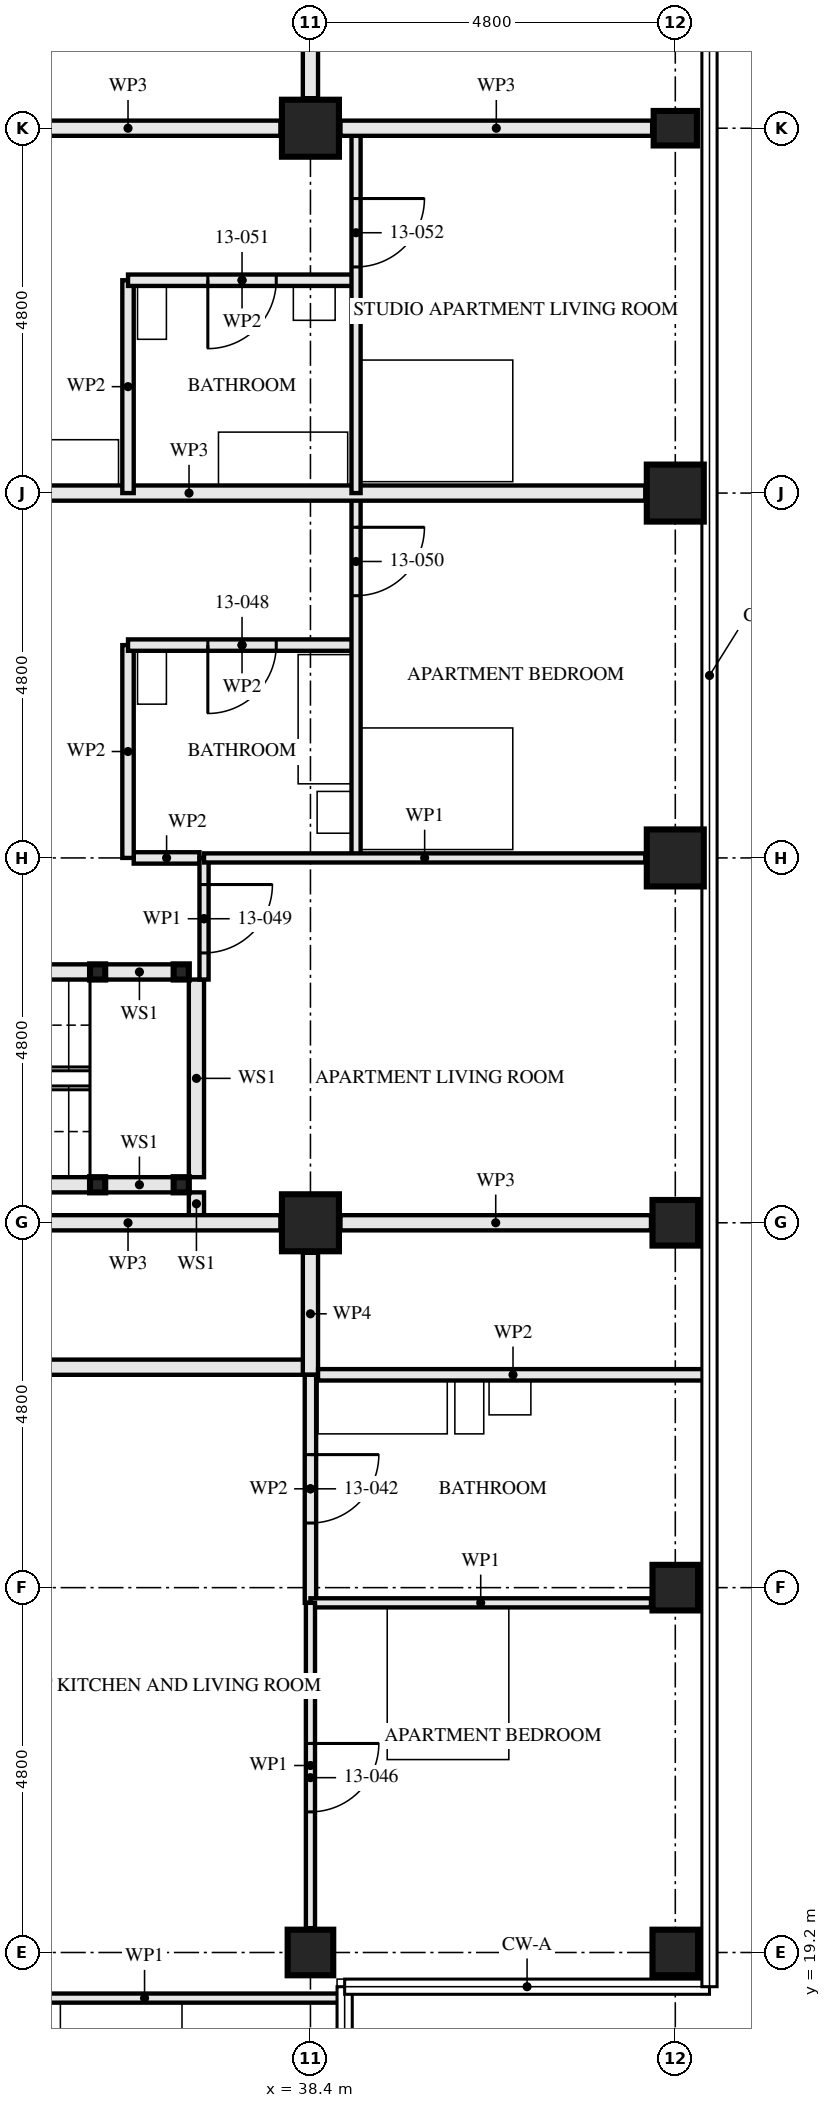
"""IFC4 building model, lengths in metres.
Left out: names, types, materials, properties, quantities, classifications, styles, units other than length and angle.
Written with IfcOpenShell. Run it as: python <this file> out.ifc"""

import sys

from ifc_helpers import new_model, si_unit, direction, frame, frame_2d, origin, origin_2d, place, context, subcontext, project, spatial, rectangle, hollow_rectangle, i_section, extrude, element, fill, save


model = new_model("IFC4")
c1 = context("Model", 3, precision=1e-05, world=origin(), true_north=direction((0.0, 1.0)))
c2 = subcontext(c1, "Body", "Model", "MODEL_VIEW")
j1 = project(units=[si_unit("LENGTHUNIT", "METRE"), si_unit("PLANEANGLEUNIT", "RADIAN")], contexts=[c1])
p1 = place(None, origin())
s1 = spatial("IfcSite", under=j1, at=p1, CompositionType="ELEMENT")
p2 = place(p1, origin())
s2 = spatial("IfcBuilding", under=s1, at=p2, CompositionType="ELEMENT")
p3 = place(p2, frame((0.0, 0.0, 51.5)))
s3 = spatial("IfcBuildingStorey", under=s2, at=p3, CompositionType="ELEMENT", Elevation=51.5)
p4 = place(p3, frame((38.4, 19.2, 0.0), z_axis=(0.0, 0.0, 1.0), x_axis=(0.0, 1.0, 0.0)))
e1 = element("IfcColumn", 1, at=p4, inside=s3, PredefinedType="COLUMN", context=c2, shape_type="SweptSolid", body=[
    extrude(hollow_rectangle(XDim=0.6, YDim=0.6, WallThickness=0.06, at=origin_2d()), origin(), (0.0, 0.0, 1.0), 3.5),
])
for number, where, z_axis, x_axis in (
    (2, (38.4, 28.8, 0.0), (0.0, 0.0, 1.0), (0.0, 1.0, 0.0)),
    (3, (38.4, 43.2, 0.0), (0.0, 0.0, 1.0), (0.0, 1.0, 0.0)),
):
    element("IfcColumn", number, at=place(p3, frame(where, z_axis=z_axis, x_axis=x_axis)), inside=s3, PredefinedType="COLUMN", context=c2, shape_type="SweptSolid", body=[
        extrude(hollow_rectangle(XDim=0.75, YDim=0.75, WallThickness=0.08, at=origin_2d()), origin(), (0.0, 0.0, 1.0), 3.5),
    ])
p5 = place(p3, frame((43.2, 19.2, 0.0), z_axis=(0.0, 0.0, 1.0), x_axis=(0.0, 1.0, 0.0)))
e4 = element("IfcColumn", 4, at=p5, inside=s3, PredefinedType="COLUMN", context=c2, shape_type="SweptSolid", body=[
    extrude(hollow_rectangle(XDim=0.6, YDim=0.6, WallThickness=0.06, at=origin_2d()), origin(), (0.0, 0.0, 1.0), 3.5),
])
for number, where, z_axis, x_axis in (
    (5, (43.2, 24.0, 0.0), (0.0, 0.0, 1.0), (1.0, 0.0, 0.0)),
    (6, (43.2, 28.8, 0.0), (0.0, 0.0, 1.0), (0.0, 1.0, 0.0)),
):
    element("IfcColumn", number, at=place(p3, frame(where, z_axis=z_axis, x_axis=x_axis)), inside=s3, PredefinedType="COLUMN", context=c2, shape_type="SweptSolid", body=[
        extrude(hollow_rectangle(XDim=0.6, YDim=0.6, WallThickness=0.08, at=origin_2d()), origin(), (0.0, 0.0, 1.0), 3.5),
    ])
for number, where, z_axis, x_axis in (
    (7, (43.2, 33.6, 0.0), (0.0, 0.0, 1.0), (1.0, 0.0, 0.0)),
    (8, (43.2, 38.4, 0.0), (0.0, 0.0, 1.0), (1.0, 0.0, 0.0)),
):
    element("IfcColumn", number, at=place(p3, frame(where, z_axis=z_axis, x_axis=x_axis)), inside=s3, PredefinedType="COLUMN", context=c2, shape_type="SweptSolid", body=[
        extrude(hollow_rectangle(XDim=0.75, YDim=0.75, WallThickness=0.08, at=origin_2d()), origin(), (0.0, 0.0, 1.0), 3.5),
    ])
p6 = place(p3, frame((43.2, 43.2, 0.0), z_axis=(0.0, 0.0, 1.0), x_axis=(0.0, 1.0, 0.0)))
e9 = element("IfcColumn", 9, at=p6, inside=s3, PredefinedType="COLUMN", context=c2, shape_type="SweptSolid", body=[
    extrude(i_section(OverallWidth=0.454, OverallDepth=0.569, WebThickness=0.078, FlangeThickness=0.125, FilletRadius=0.015, at=origin_2d()), origin(), (0.0, 0.0, 1.0), 3.5),
])
for number, where, z_axis, x_axis in (
    (10, (36.7, 29.3, 0.0), (0.0, 0.0, 1.0), (1.0, 0.0, 0.0)),
    (11, (36.7, 32.1, 0.0), (0.0, 0.0, 1.0), (1.0, 0.0, 0.0)),
    (12, (35.6, 29.3, 0.0), (0.0, 0.0, 1.0), (1.0, 0.0, 0.0)),
    (13, (35.6, 32.1, 0.0), (0.0, 0.0, 1.0), (1.0, 0.0, 0.0)),
):
    element("IfcColumn", number, at=place(p3, frame(where, z_axis=z_axis, x_axis=x_axis)), inside=s3, PredefinedType="COLUMN", context=c2, shape_type="SweptSolid", body=[
        extrude(hollow_rectangle(XDim=0.2, YDim=0.2, WallThickness=0.008, at=origin_2d()), origin(), (0.0, 0.0, 1.0), 3.33),
    ])
p7 = place(p3, frame((38.4, 23.8, 0.0), z_axis=(0.0, 0.0, 1.0), x_axis=(0.0, 1.0, 0.0)))
e14 = element("IfcWall", 14, at=p7, inside=s3, PredefinedType="PARTITIONING", context=c2, shape_type="SweptSolid", body=[
    extrude(rectangle(XDim=3.0, YDim=0.15, at=frame_2d((1.5, 0.0))), origin(), (0.0, 0.0, 1.0), 2.55),
])
p8 = place(p7, frame((1.05, 0.0, 0.0)))
e15 = element("IfcOpeningElement", 15, at=p8, cuts=e14, PredefinedType="OPENING", context=c2, shape_type="SweptSolid", body=[
    extrude(rectangle(XDim=0.9, YDim=2.1, at=frame_2d((0.45, 1.05))), frame((0.0, 0.085, 0.0), z_axis=(0.0, -1.0, 0.0), x_axis=(1.0, 0.0, 0.0)), (0.0, 0.0, 1.0), 0.171),
])
p9 = place(p3, frame((33.6, 18.6, 0.0), z_axis=(0.0, 0.0, 1.0), x_axis=(1.0, 0.0, 0.0)))
e16 = element("IfcWall", 16, at=p9, inside=s3, PredefinedType="PARTITIONING", context=c2, shape_type="SweptSolid", body=[
    extrude(rectangle(XDim=5.235, YDim=0.12, at=frame_2d((2.617, 0.0))), origin(), (0.0, 0.0, 1.0), 2.32),
])
p10 = place(p9, frame((0.45, 0.0, 0.0)))
e17 = element("IfcOpeningElement", 17, at=p10, cuts=e16, PredefinedType="OPENING", context=c2, shape_type="SweptSolid", body=[
    extrude(rectangle(XDim=0.9, YDim=2.1, at=frame_2d((0.45, 1.05))), frame((0.0, 0.071, 0.0), z_axis=(0.0, -1.0, 0.0), x_axis=(1.0, 0.0, 0.0)), (0.0, 0.0, 1.0), 0.141),
])
p11 = place(p3, frame((38.4, 23.8, 0.0), z_axis=(0.0, 0.0, 1.0), x_axis=(1.0, 0.0, 0.0)))
e18 = element("IfcWall", 18, at=p11, inside=s3, PredefinedType="PARTITIONING", context=c2, shape_type="SweptSolid", body=[
    extrude(rectangle(XDim=4.48, YDim=0.12, at=frame_2d((2.24, 0.0))), origin(), (0.0, 0.0, 1.0), 3.33),
])
p12 = place(p3, frame((38.4, 19.52, 0.0), z_axis=(0.0, 0.0, 1.0), x_axis=(0.0, 1.0, 0.0)))
e19 = element("IfcWall", 19, at=p12, inside=s3, PredefinedType="PARTITIONING", context=c2, shape_type="SweptSolid", body=[
    extrude(rectangle(XDim=4.28, YDim=0.12, at=frame_2d((2.14, 0.0))), origin(), (0.0, 0.0, 1.0), 3.33),
])
p13 = place(p12, frame((1.53, 0.0, 0.0)))
e20 = element("IfcOpeningElement", 20, at=p13, cuts=e19, PredefinedType="OPENING", context=c2, shape_type="SweptSolid", body=[
    extrude(rectangle(XDim=0.9, YDim=2.1, at=frame_2d((0.45, 1.05))), frame((0.0, 0.071, 0.0), z_axis=(0.0, -1.0, 0.0), x_axis=(1.0, 0.0, 0.0)), (0.0, 0.0, 1.0), 0.141),
])
p14 = place(p3, frame((28.8, 26.9, 0.0), z_axis=(0.0, 0.0, 1.0), x_axis=(1.0, 0.0, 0.0)))
e21 = element("IfcWall", 21, at=p14, inside=s3, PredefinedType="PARTITIONING", context=c2, shape_type="SweptSolid", body=[
    extrude(rectangle(XDim=9.6, YDim=0.2, at=frame_2d((4.8, 0.0))), origin(), (0.0, 0.0, 1.0), 3.33),
])
p15 = place(p14, frame((0.4, 0.0, 0.0)))
e22 = element("IfcOpeningElement", 22, at=p15, cuts=e21, PredefinedType="OPENING", context=c2, shape_type="SweptSolid", body=[
    extrude(rectangle(XDim=1.0, YDim=2.1, at=frame_2d((0.5, 1.05))), frame((0.0, 0.111, 0.0), z_axis=(0.0, -1.0, 0.0), x_axis=(1.0, 0.0, 0.0)), (0.0, 0.0, 1.0), 0.221),
])
p16 = place(p3, frame((38.4, 26.8, 0.0), z_axis=(0.0, 0.0, 1.0), x_axis=(0.0, 1.0, 0.0)))
e23 = element("IfcWall", 23, at=p16, inside=s3, PredefinedType="PARTITIONING", context=c2, shape_type="SweptSolid", body=[
    extrude(rectangle(XDim=1.605, YDim=0.2, at=frame_2d((0.802, 0.0))), origin(), (0.0, 0.0, 1.0), 3.33),
])
p17 = place(p3, frame((36.6, 29.3, 0.0), z_axis=(0.0, 0.0, 1.0), x_axis=(-1.0, 0.0, 0.0)))
e24 = element("IfcWall", 24, at=p17, inside=s3, PredefinedType="SOLIDWALL", context=c2, shape_type="SweptSolid", body=[
    extrude(rectangle(XDim=0.9, YDim=0.2, at=frame_2d((0.45, 0.0))), origin(), (0.0, 0.0, 1.0), 2.99),
])
p18 = place(p3, frame((35.5, 29.3, 0.0), z_axis=(0.0, 0.0, 1.0), x_axis=(-1.0, 0.0, 0.0)))
e25 = element("IfcWall", 25, at=p18, inside=s3, PredefinedType="SOLIDWALL", context=c2, shape_type="SweptSolid", body=[
    extrude(rectangle(XDim=4.7, YDim=0.2, at=frame_2d((2.35, 0.0))), origin(), (0.0, 0.0, 1.0), 2.99),
])
p19 = place(p3, frame((36.6, 32.1, 0.0), z_axis=(0.0, 0.0, 1.0), x_axis=(-1.0, 0.0, 0.0)))
e26 = element("IfcWall", 26, at=p19, inside=s3, PredefinedType="SOLIDWALL", context=c2, shape_type="SweptSolid", body=[
    extrude(rectangle(XDim=0.9, YDim=0.2, at=frame_2d((0.45, 0.0))), origin(), (0.0, 0.0, 1.0), 2.99),
])
p20 = place(p3, frame((35.5, 32.1, 0.0), z_axis=(0.0, 0.0, 1.0), x_axis=(-1.0, 0.0, 0.0)))
e27 = element("IfcWall", 27, at=p20, inside=s3, PredefinedType="SOLIDWALL", context=c2, shape_type="SweptSolid", body=[
    extrude(rectangle(XDim=4.7, YDim=0.2, at=frame_2d((2.35, 0.0))), origin(), (0.0, 0.0, 1.0), 2.99),
])
p21 = place(p3, frame((36.9, 28.9, 0.0), z_axis=(0.0, 0.0, 1.0), x_axis=(0.0, 1.0, 0.0)))
e28 = element("IfcWall", 28, at=p21, inside=s3, PredefinedType="SOLIDWALL", context=c2, shape_type="SweptSolid", body=[
    extrude(rectangle(XDim=0.3, YDim=0.2, at=frame_2d((0.15, 0.0))), origin(), (0.0, 0.0, 1.0), 3.33),
])
p22 = place(p3, frame((36.9, 29.4, 0.0), z_axis=(0.0, 0.0, 1.0), x_axis=(0.0, 1.0, 0.0)))
e29 = element("IfcWall", 29, at=p22, inside=s3, PredefinedType="SOLIDWALL", context=c2, shape_type="SweptSolid", body=[
    extrude(rectangle(XDim=2.6, YDim=0.2, at=frame_2d((1.3, 0.0))), origin(), (0.0, 0.0, 1.0), 3.33),
])
p23 = place(p3, frame((39.0, 36.4, 0.0), z_axis=(0.0, 0.0, 1.0), x_axis=(-1.0, 0.0, 0.0)))
e30 = element("IfcWall", 30, at=p23, inside=s3, PredefinedType="PARTITIONING", context=c2, shape_type="SweptSolid", body=[
    extrude(rectangle(XDim=3.0, YDim=0.15, at=frame_2d((1.5, 0.0))), origin(), (0.0, 0.0, 1.0), 3.33),
])
p24 = place(p23, frame((1.05, 0.0, 0.0)))
e31 = element("IfcOpeningElement", 31, at=p24, cuts=e30, PredefinedType="OPENING", context=c2, shape_type="SweptSolid", body=[
    extrude(rectangle(XDim=0.9, YDim=2.1, at=frame_2d((0.45, 1.05))), frame((0.0, 0.085, 0.0), z_axis=(0.0, -1.0, 0.0), x_axis=(1.0, 0.0, 0.0)), (0.0, 0.0, 1.0), 0.171),
])
p25 = place(p3, frame((36.0, 33.6, 0.0), z_axis=(0.0, 0.0, 1.0), x_axis=(0.0, 1.0, 0.0)))
e32 = element("IfcWall", 32, at=p25, inside=s3, PredefinedType="PARTITIONING", context=c2, shape_type="SweptSolid", body=[
    extrude(rectangle(XDim=2.8, YDim=0.15, at=frame_2d((1.4, 0.0))), origin(), (0.0, 0.0, 1.0), 3.33),
])
p26 = place(p3, frame((37.0, 32.0, 0.0), z_axis=(0.0, 0.0, 1.0), x_axis=(0.0, 1.0, 0.0)))
e33 = element("IfcWall", 33, at=p26, inside=s3, PredefinedType="PARTITIONING", context=c2, shape_type="SweptSolid", body=[
    extrude(rectangle(XDim=1.6, YDim=0.12, at=frame_2d((0.8, 0.0))), origin(), (0.0, 0.0, 1.0), 3.33),
])
p27 = place(p26, frame((0.35, 0.0, 0.0)))
e34 = element("IfcOpeningElement", 34, at=p27, cuts=e33, PredefinedType="OPENING", context=c2, shape_type="SweptSolid", body=[
    extrude(rectangle(XDim=0.9, YDim=2.1, at=frame_2d((0.45, 1.05))), frame((0.0, 0.071, 0.0), z_axis=(0.0, -1.0, 0.0), x_axis=(1.0, 0.0, 0.0)), (0.0, 0.0, 1.0), 0.141),
])
p28 = place(p3, frame((39.0, 33.6, 0.0), z_axis=(0.0, 0.0, 1.0), x_axis=(0.0, 1.0, 0.0)))
e35 = element("IfcWall", 35, at=p28, inside=s3, PredefinedType="PARTITIONING", context=c2, shape_type="SweptSolid", body=[
    extrude(rectangle(XDim=4.8, YDim=0.12, at=frame_2d((2.4, 0.0))), origin(), (0.0, 0.0, 1.0), 3.33),
])
p29 = place(p28, frame((3.45, 0.0, 0.0)))
e36 = element("IfcOpeningElement", 36, at=p29, cuts=e35, PredefinedType="OPENING", context=c2, shape_type="SweptSolid", body=[
    extrude(rectangle(XDim=0.9, YDim=2.1, at=frame_2d((0.45, 1.05))), frame((0.0, 0.071, 0.0), z_axis=(0.0, -1.0, 0.0), x_axis=(1.0, 0.0, 0.0)), (0.0, 0.0, 1.0), 0.141),
])
p30 = place(p3, frame((42.805, 33.6, 0.0), z_axis=(0.0, 0.0, 1.0), x_axis=(-1.0, 0.0, 0.0)))
e37 = element("IfcWall", 37, at=p30, inside=s3, PredefinedType="PARTITIONING", context=c2, shape_type="SweptSolid", body=[
    extrude(rectangle(XDim=5.805, YDim=0.12, at=frame_2d((2.902, 0.0))), origin(), (0.0, 0.0, 1.0), 2.55),
])
p31 = place(p3, frame((42.805, 38.4, 0.0), z_axis=(0.0, 0.0, 1.0), x_axis=(-1.0, 0.0, 0.0)))
e38 = element("IfcWall", 38, at=p31, inside=s3, PredefinedType="PARTITIONING", context=c2, shape_type="SweptSolid", body=[
    extrude(rectangle(XDim=12.005, YDim=0.2, at=frame_2d((6.002, 0.0))), origin(), (0.0, 0.0, 1.0), 2.55),
])
p32 = place(p3, frame((39.0, 41.2, 0.0), z_axis=(0.0, 0.0, 1.0), x_axis=(-1.0, 0.0, 0.0)))
e39 = element("IfcWall", 39, at=p32, inside=s3, PredefinedType="PARTITIONING", context=c2, shape_type="SweptSolid", body=[
    extrude(rectangle(XDim=3.0, YDim=0.15, at=frame_2d((1.5, 0.0))), origin(), (0.0, 0.0, 1.0), 3.33),
])
p33 = place(p32, frame((1.05, 0.0, 0.0)))
e40 = element("IfcOpeningElement", 40, at=p33, cuts=e39, PredefinedType="OPENING", context=c2, shape_type="SweptSolid", body=[
    extrude(rectangle(XDim=0.9, YDim=2.1, at=frame_2d((0.45, 1.05))), frame((0.0, 0.085, 0.0), z_axis=(0.0, -1.0, 0.0), x_axis=(1.0, 0.0, 0.0)), (0.0, 0.0, 1.0), 0.171),
])
p34 = place(p3, frame((36.0, 38.4, 0.0), z_axis=(0.0, 0.0, 1.0), x_axis=(0.0, 1.0, 0.0)))
e41 = element("IfcWall", 41, at=p34, inside=s3, PredefinedType="PARTITIONING", context=c2, shape_type="SweptSolid", body=[
    extrude(rectangle(XDim=2.8, YDim=0.15, at=frame_2d((1.4, 0.0))), origin(), (0.0, 0.0, 1.0), 3.33),
])
p35 = place(p3, frame((39.0, 38.4, 0.0), z_axis=(0.0, 0.0, 1.0), x_axis=(0.0, 1.0, 0.0)))
e42 = element("IfcWall", 42, at=p35, inside=s3, PredefinedType="PARTITIONING", context=c2, shape_type="SweptSolid", body=[
    extrude(rectangle(XDim=4.8, YDim=0.12, at=frame_2d((2.4, 0.0))), origin(), (0.0, 0.0, 1.0), 3.33),
])
p36 = place(p35, frame((2.975, 0.0, 0.0)))
e43 = element("IfcOpeningElement", 43, at=p36, cuts=e42, PredefinedType="OPENING", context=c2, shape_type="SweptSolid", body=[
    extrude(rectangle(XDim=0.9, YDim=2.1, at=frame_2d((0.45, 1.05))), frame((0.0, 0.071, 0.0), z_axis=(0.0, -1.0, 0.0), x_axis=(1.0, 0.0, 0.0)), (0.0, 0.0, 1.0), 0.141),
])
p37 = place(p3, frame((38.4, 45.2, 0.0), z_axis=(0.0, 0.0, 1.0), x_axis=(0.0, -1.0, 0.0)))
e44 = element("IfcWall", 44, at=p37, inside=s3, PredefinedType="PARTITIONING", context=c2, shape_type="SweptSolid", body=[
    extrude(rectangle(XDim=1.605, YDim=0.2, at=frame_2d((0.802, 0.0))), origin(), (0.0, 0.0, 1.0), 3.33),
])
p38 = place(p3, frame((42.88, 28.8, 0.0), z_axis=(0.0, 0.0, 1.0), x_axis=(-1.0, 0.0, 0.0)))
e45 = element("IfcWall", 45, at=p38, inside=s3, PredefinedType="PARTITIONING", context=c2, shape_type="SweptSolid", body=[
    extrude(rectangle(XDim=4.085, YDim=0.2, at=frame_2d((2.042, 0.0))), origin(), (0.0, 0.0, 1.0), 2.32),
])
p39 = place(p3, frame((38.005, 28.8, 0.0), z_axis=(0.0, 0.0, 1.0), x_axis=(-1.0, 0.0, 0.0)))
e46 = element("IfcWall", 46, at=p39, inside=s3, PredefinedType="PARTITIONING", context=c2, shape_type="SweptSolid", body=[
    extrude(rectangle(XDim=4.01, YDim=0.2, at=frame_2d((2.005, 0.0))), origin(), (0.0, 0.0, 1.0), 2.32),
])
p40 = place(p3, frame((42.896, 43.2, 0.0), z_axis=(0.0, 0.0, 1.0), x_axis=(-1.0, 0.0, 0.0)))
e47 = element("IfcWall", 47, at=p40, inside=s3, PredefinedType="PARTITIONING", context=c2, shape_type="SweptSolid", body=[
    extrude(rectangle(XDim=4.101, YDim=0.2, at=frame_2d((2.05, 0.0))), origin(), (0.0, 0.0, 1.0), 2.32),
])
p41 = place(p3, frame((38.005, 43.2, 0.0), z_axis=(0.0, 0.0, 1.0), x_axis=(-1.0, 0.0, 0.0)))
e48 = element("IfcWall", 48, at=p41, inside=s3, PredefinedType="PARTITIONING", context=c2, shape_type="SweptSolid", body=[
    extrude(rectangle(XDim=4.01, YDim=0.2, at=frame_2d((2.005, 0.0))), origin(), (0.0, 0.0, 1.0), 2.32),
])
p42 = place(p3, frame((38.5, 26.8, 0.0), z_axis=(0.0, 0.0, 1.0), x_axis=(1.0, 0.0, 0.0)))
e49 = element("IfcWall", 49, at=p42, inside=s3, PredefinedType="PARTITIONING", context=c2, shape_type="SweptSolid", body=[
    extrude(rectangle(XDim=5.13, YDim=0.15, at=frame_2d((2.565, 0.0))), origin(), (0.0, 0.0, 1.0), 2.32),
])
p43 = place(p3, frame((36.94, 33.6, 0.0), z_axis=(0.0, 0.0, 1.0), x_axis=(-1.0, 0.0, 0.0)))
e50 = element("IfcWall", 50, at=p43, inside=s3, PredefinedType="PARTITIONING", context=c2, shape_type="SweptSolid", body=[
    extrude(rectangle(XDim=0.865, YDim=0.15, at=frame_2d((0.433, 0.0))), origin(), (0.0, 0.0, 1.0), 2.55),
])
p44 = place(p8, frame((0.9, 0.0, 0.0), z_axis=(0.0, 0.0, 1.0), x_axis=(-1.0, 0.0, 0.0)))
e51 = element("IfcDoor", 51, at=p44, inside=s3, OperationType="SINGLE_SWING_RIGHT", PredefinedType="DOOR", context=c2, shape_type="SweptSolid", body=[
    extrude(rectangle(XDim=0.9, YDim=2.1, at=frame_2d((0.45, 1.05))), frame((0.0, 0.022, 0.0), z_axis=(0.0, -1.0, 0.0), x_axis=(1.0, 0.0, 0.0)), (0.0, 0.0, 1.0), 0.044),
])
fill(e15, e51)
p45 = place(p13, frame((0.9, 0.0, 0.0), z_axis=(0.0, 0.0, 1.0), x_axis=(-1.0, 0.0, 0.0)))
e52 = element("IfcDoor", 52, at=p45, inside=s3, OperationType="SINGLE_SWING_RIGHT", PredefinedType="DOOR", context=c2, shape_type="SweptSolid", body=[
    extrude(rectangle(XDim=0.9, YDim=2.1, at=frame_2d((0.45, 1.05))), frame((0.0, 0.022, 0.0), z_axis=(0.0, -1.0, 0.0), x_axis=(1.0, 0.0, 0.0)), (0.0, 0.0, 1.0), 0.044),
])
fill(e20, e52)
p46 = place(p24, origin())
e53 = element("IfcDoor", 53, at=p46, inside=s3, OperationType="SINGLE_SWING_LEFT", PredefinedType="DOOR", context=c2, shape_type="SweptSolid", body=[
    extrude(rectangle(XDim=0.9, YDim=2.1, at=frame_2d((0.45, 1.05))), frame((0.0, 0.022, 0.0), z_axis=(0.0, -1.0, 0.0), x_axis=(1.0, 0.0, 0.0)), (0.0, 0.0, 1.0), 0.044),
])
fill(e31, e53)
p47 = place(p27, frame((0.9, 0.0, 0.0), z_axis=(0.0, 0.0, 1.0), x_axis=(-1.0, 0.0, 0.0)))
e54 = element("IfcDoor", 54, at=p47, inside=s3, OperationType="SINGLE_SWING_RIGHT", PredefinedType="DOOR", context=c2, shape_type="SweptSolid", body=[
    extrude(rectangle(XDim=0.9, YDim=2.1, at=frame_2d((0.45, 1.05))), frame((0.0, 0.022, 0.0), z_axis=(0.0, -1.0, 0.0), x_axis=(1.0, 0.0, 0.0)), (0.0, 0.0, 1.0), 0.044),
])
fill(e34, e54)
p48 = place(p29, frame((0.9, 0.0, 0.0), z_axis=(0.0, 0.0, 1.0), x_axis=(-1.0, 0.0, 0.0)))
e55 = element("IfcDoor", 55, at=p48, inside=s3, OperationType="SINGLE_SWING_RIGHT", PredefinedType="DOOR", context=c2, shape_type="SweptSolid", body=[
    extrude(rectangle(XDim=0.9, YDim=2.1, at=frame_2d((0.45, 1.05))), frame((0.0, 0.022, 0.0), z_axis=(0.0, -1.0, 0.0), x_axis=(1.0, 0.0, 0.0)), (0.0, 0.0, 1.0), 0.044),
])
fill(e36, e55)
p49 = place(p33, origin())
e56 = element("IfcDoor", 56, at=p49, inside=s3, OperationType="SINGLE_SWING_LEFT", PredefinedType="DOOR", context=c2, shape_type="SweptSolid", body=[
    extrude(rectangle(XDim=0.9, YDim=2.1, at=frame_2d((0.45, 1.05))), frame((0.0, 0.022, 0.0), z_axis=(0.0, -1.0, 0.0), x_axis=(1.0, 0.0, 0.0)), (0.0, 0.0, 1.0), 0.044),
])
fill(e40, e56)
p50 = place(p36, frame((0.9, 0.0, 0.0), z_axis=(0.0, 0.0, 1.0), x_axis=(-1.0, 0.0, 0.0)))
e57 = element("IfcDoor", 57, at=p50, inside=s3, OperationType="SINGLE_SWING_RIGHT", PredefinedType="DOOR", context=c2, shape_type="SweptSolid", body=[
    extrude(rectangle(XDim=0.9, YDim=2.1, at=frame_2d((0.45, 1.05))), frame((0.0, 0.022, 0.0), z_axis=(0.0, -1.0, 0.0), x_axis=(1.0, 0.0, 0.0)), (0.0, 0.0, 1.0), 0.044),
])
fill(e43, e57)
save(model, sys.argv[1])
